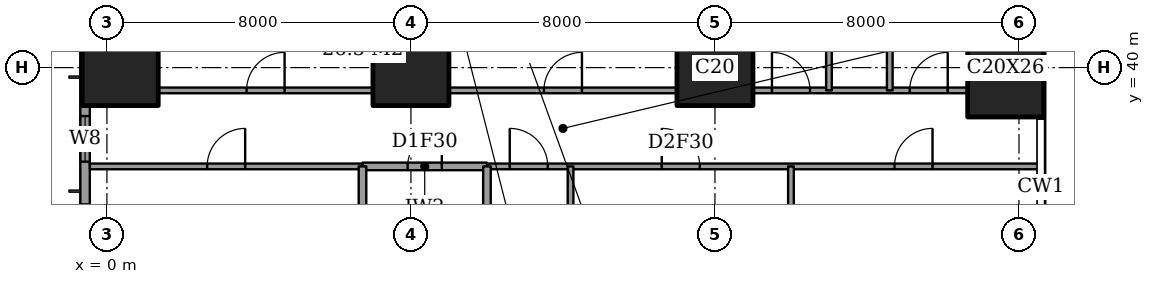
"""IFC4 building model, lengths in metres.
Left out: names, types, materials, properties, quantities, classifications, styles, units other than length and angle.
Written with IfcOpenShell. Run it as: python <this file> out.ifc"""

import sys

from ifc_helpers import new_model, si_unit, direction, frame, frame_2d, origin, origin_2d, place, context, subcontext, project, spatial, rectangle, extrude, element, fill, save


model = new_model("IFC4")
c1 = context("Model", 3, precision=1e-05, world=origin(), true_north=direction((0.0, 1.0)))
c2 = subcontext(c1, "Body", "Model", "MODEL_VIEW")
j1 = project(units=[si_unit("LENGTHUNIT", "METRE"), si_unit("PLANEANGLEUNIT", "RADIAN")], contexts=[c1])
p1 = place(None, origin())
s1 = spatial("IfcSite", under=j1, at=p1, CompositionType="ELEMENT")
p2 = place(p1, origin())
s2 = spatial("IfcBuilding", under=s1, at=p2, CompositionType="ELEMENT")
p3 = place(p2, frame((0.0, 0.0, 83.6)))
s3 = spatial("IfcBuildingStorey", under=s2, at=p3, CompositionType="ELEMENT", Elevation=83.6)
for number, where, z_axis, x_axis in (
    (1, (0.35, 40.0, 0.0), (0.0, 0.0, 1.0), (1.0, 0.0, 0.0)),
    (2, (8.0, 40.0, 0.0), (0.0, 0.0, 1.0), (1.0, 0.0, 0.0)),
    (3, (16.0, 40.0, 0.0), (0.0, 0.0, 1.0), (1.0, 0.0, 0.0)),
):
    element("IfcColumn", number, at=place(p3, frame(where, z_axis=z_axis, x_axis=x_axis)), inside=s3, PredefinedType="COLUMN", context=c2, shape_type="SweptSolid", body=[
        extrude(rectangle(XDim=2.0, YDim=2.0, at=origin_2d()), origin(), (0.0, 0.0, 1.0), 3.6),
    ])
p4 = place(p3, frame((23.65, 40.0, 0.0), z_axis=(0.0, 0.0, 1.0), x_axis=(1.0, 0.0, 0.0)))
e4 = element("IfcColumn", 4, at=p4, inside=s3, PredefinedType="COLUMN", context=c2, shape_type="SweptSolid", body=[
    extrude(rectangle(XDim=2.0, YDim=2.6, at=origin_2d()), origin(), (0.0, 0.0, 1.0), 3.6),
])
p5 = place(p3, frame((-0.575, 44.825, 0.0), z_axis=(0.0, 0.0, 1.0), x_axis=(0.0, -1.0, 0.0)))
e5 = element("IfcWall", 5, at=p5, inside=s3, PredefinedType="SOLIDWALL", context=c2, shape_type="SweptSolid", body=[
    extrude(rectangle(XDim=41.65, YDim=0.25, at=frame_2d((20.825, 0.0))), origin(), (0.0, 0.0, 1.0), 3.6),
])
p6 = place(p5, frame((0.775, 0.0, 0.6)))
e6 = element("IfcOpeningElement", 6, at=p6, cuts=e5, PredefinedType="OPENING", context=c2, shape_type="SweptSolid", body=[
    extrude(rectangle(XDim=2.4, YDim=2.0, at=frame_2d((1.2, 1.0))), frame((0.0, 0.135, 0.0), z_axis=(0.0, -1.0, 0.0), x_axis=(1.0, 0.0, 0.0)), (0.0, 0.0, 1.0), 0.27),
])
p7 = place(p5, frame((6.1, 0.0, 0.6)))
e7 = element("IfcOpeningElement", 7, at=p7, cuts=e5, PredefinedType="OPENING", context=c2, shape_type="SweptSolid", body=[
    extrude(rectangle(XDim=1.2, YDim=2.0, at=frame_2d((0.6, 1.0))), frame((0.0, 0.135, 0.0), z_axis=(0.0, -1.0, 0.0), x_axis=(1.0, 0.0, 0.0)), (0.0, 0.0, 1.0), 0.27),
])
p8 = place(p5, frame((8.425, 0.0, 0.6)))
e8 = element("IfcOpeningElement", 8, at=p8, cuts=e5, PredefinedType="OPENING", context=c2, shape_type="SweptSolid", body=[
    extrude(rectangle(XDim=2.4, YDim=2.0, at=frame_2d((1.2, 1.0))), frame((0.0, 0.135, 0.0), z_axis=(0.0, -1.0, 0.0), x_axis=(1.0, 0.0, 0.0)), (0.0, 0.0, 1.0), 0.27),
])
p9 = place(p5, frame((15.625, 0.0, 0.6)))
e9 = element("IfcOpeningElement", 9, at=p9, cuts=e5, PredefinedType="OPENING", context=c2, shape_type="SweptSolid", body=[
    extrude(rectangle(XDim=2.4, YDim=2.0, at=frame_2d((1.2, 1.0))), frame((0.0, 0.135, 0.0), z_axis=(0.0, -1.0, 0.0), x_axis=(1.0, 0.0, 0.0)), (0.0, 0.0, 1.0), 0.27),
])
p10 = place(p5, frame((23.625, 0.0, 0.6)))
e10 = element("IfcOpeningElement", 10, at=p10, cuts=e5, PredefinedType="OPENING", context=c2, shape_type="SweptSolid", body=[
    extrude(rectangle(XDim=2.4, YDim=2.0, at=frame_2d((1.2, 1.0))), frame((0.0, 0.135, 0.0), z_axis=(0.0, -1.0, 0.0), x_axis=(1.0, 0.0, 0.0)), (0.0, 0.0, 1.0), 0.27),
])
p11 = place(p5, frame((30.825, 0.0, 0.6)))
e11 = element("IfcOpeningElement", 11, at=p11, cuts=e5, PredefinedType="OPENING", context=c2, shape_type="SweptSolid", body=[
    extrude(rectangle(XDim=2.4, YDim=2.0, at=frame_2d((1.2, 1.0))), frame((0.0, 0.135, 0.0), z_axis=(0.0, -1.0, 0.0), x_axis=(1.0, 0.0, 0.0)), (0.0, 0.0, 1.0), 0.27),
])
p12 = place(p5, frame((34.5, 0.0, 0.6)))
e12 = element("IfcOpeningElement", 12, at=p12, cuts=e5, PredefinedType="OPENING", context=c2, shape_type="SweptSolid", body=[
    extrude(rectangle(XDim=1.2, YDim=2.0, at=frame_2d((0.6, 1.0))), frame((0.0, 0.135, 0.0), z_axis=(0.0, -1.0, 0.0), x_axis=(1.0, 0.0, 0.0)), (0.0, 0.0, 1.0), 0.27),
])
p13 = place(p5, frame((38.475, 0.0, 0.6)))
e13 = element("IfcOpeningElement", 13, at=p13, cuts=e5, PredefinedType="OPENING", context=c2, shape_type="SweptSolid", body=[
    extrude(rectangle(XDim=2.4, YDim=2.0, at=frame_2d((1.2, 1.0))), frame((0.0, 0.135, 0.0), z_axis=(0.0, -1.0, 0.0), x_axis=(1.0, 0.0, 0.0)), (0.0, 0.0, 1.0), 0.27),
])
p14 = place(p3, frame((6.725, 37.4, 0.0), z_axis=(0.0, 0.0, 1.0), x_axis=(1.0, 0.0, 0.0)))
e14 = element("IfcWall", 14, at=p14, inside=s3, PredefinedType="PARTITIONING", context=c2, shape_type="SweptSolid", body=[
    extrude(rectangle(XDim=3.275, YDim=0.2, at=frame_2d((1.637, 0.0))), origin(), (0.0, 0.0, 1.0), 3.35),
])
p15 = place(p14, frame((1.188, 0.0, 0.0)))
e15 = element("IfcOpeningElement", 15, at=p15, cuts=e14, PredefinedType="OPENING", context=c2, shape_type="SweptSolid", body=[
    extrude(rectangle(XDim=0.9, YDim=2.1, at=frame_2d((0.45, 1.05))), frame((0.0, 0.11, 0.0), z_axis=(0.0, -1.0, 0.0), x_axis=(1.0, 0.0, 0.0)), (0.0, 0.0, 1.0), 0.22),
])
p16 = place(p3, frame((-0.45, 37.4, 0.0), z_axis=(0.0, 0.0, 1.0), x_axis=(1.0, 0.0, 0.0)))
e16 = element("IfcWall", 16, at=p16, inside=s3, PredefinedType="PARTITIONING", context=c2, shape_type="SweptSolid", body=[
    extrude(rectangle(XDim=7.175, YDim=0.15, at=frame_2d((3.587, 0.0))), origin(), (0.0, 0.0, 1.0), 3.35),
])
p17 = place(p16, frame((3.087, 0.0, 0.0)))
e17 = element("IfcOpeningElement", 17, at=p17, cuts=e16, PredefinedType="OPENING", context=c2, shape_type="SweptSolid", body=[
    extrude(rectangle(XDim=1.0, YDim=2.1, at=frame_2d((0.5, 1.05))), frame((0.0, 0.085, 0.0), z_axis=(0.0, -1.0, 0.0), x_axis=(1.0, 0.0, 0.0)), (0.0, 0.0, 1.0), 0.17),
])
p18 = place(p3, frame((10.0, 37.4, 0.0), z_axis=(0.0, 0.0, 1.0), x_axis=(1.0, 0.0, 0.0)))
e18 = element("IfcWall", 18, at=p18, inside=s3, PredefinedType="PARTITIONING", context=c2, shape_type="SweptSolid", body=[
    extrude(rectangle(XDim=14.561, YDim=0.15, at=frame_2d((7.281, 0.0))), origin(), (0.0, 0.0, 1.0), 3.35),
])
p19 = place(p18, frame((0.6, 0.0, 0.0)))
e19 = element("IfcOpeningElement", 19, at=p19, cuts=e18, PredefinedType="OPENING", context=c2, shape_type="SweptSolid", body=[
    extrude(rectangle(XDim=1.0, YDim=2.1, at=frame_2d((0.5, 1.05))), frame((0.0, 0.085, 0.0), z_axis=(0.0, -1.0, 0.0), x_axis=(1.0, 0.0, 0.0)), (0.0, 0.0, 1.0), 0.17),
])
p20 = place(p18, frame((4.6, 0.0, 0.0)))
e20 = element("IfcOpeningElement", 20, at=p20, cuts=e18, PredefinedType="OPENING", context=c2, shape_type="SweptSolid", body=[
    extrude(rectangle(XDim=1.0, YDim=2.1, at=frame_2d((0.5, 1.05))), frame((0.0, 0.085, 0.0), z_axis=(0.0, -1.0, 0.0), x_axis=(1.0, 0.0, 0.0)), (0.0, 0.0, 1.0), 0.17),
])
p21 = place(p18, frame((10.725, 0.0, 0.0)))
e21 = element("IfcOpeningElement", 21, at=p21, cuts=e18, PredefinedType="OPENING", context=c2, shape_type="SweptSolid", body=[
    extrude(rectangle(XDim=1.0, YDim=2.1, at=frame_2d((0.5, 1.05))), frame((0.0, 0.085, 0.0), z_axis=(0.0, -1.0, 0.0), x_axis=(1.0, 0.0, 0.0)), (0.0, 0.0, 1.0), 0.17),
])
p22 = place(p3, frame((1.35, 39.4, 0.0), z_axis=(0.0, 0.0, 1.0), x_axis=(1.0, 0.0, 0.0)))
e22 = element("IfcWall", 22, at=p22, inside=s3, PredefinedType="PARTITIONING", context=c2, shape_type="SweptSolid", body=[
    extrude(rectangle(XDim=5.65, YDim=0.15, at=frame_2d((2.825, 0.0))), origin(), (0.0, 0.0, 1.0), 3.35),
])
p23 = place(p22, frame((2.325, 0.0, 0.0)))
e23 = element("IfcOpeningElement", 23, at=p23, cuts=e22, PredefinedType="OPENING", context=c2, shape_type="SweptSolid", body=[
    extrude(rectangle(XDim=1.0, YDim=2.1, at=frame_2d((0.5, 1.05))), frame((0.0, 0.085, 0.0), z_axis=(0.0, -1.0, 0.0), x_axis=(1.0, 0.0, 0.0)), (0.0, 0.0, 1.0), 0.17),
])
p24 = place(p3, frame((9.0, 39.4, 0.0), z_axis=(0.0, 0.0, 1.0), x_axis=(1.0, 0.0, 0.0)))
e24 = element("IfcWall", 24, at=p24, inside=s3, PredefinedType="PARTITIONING", context=c2, shape_type="SweptSolid", body=[
    extrude(rectangle(XDim=6.0, YDim=0.15, at=frame_2d((3.0, 0.0))), origin(), (0.0, 0.0, 1.0), 3.35),
])
p25 = place(p24, frame((2.5, 0.0, 0.0)))
e25 = element("IfcOpeningElement", 25, at=p25, cuts=e24, PredefinedType="OPENING", context=c2, shape_type="SweptSolid", body=[
    extrude(rectangle(XDim=1.0, YDim=2.1, at=frame_2d((0.5, 1.05))), frame((0.0, 0.085, 0.0), z_axis=(0.0, -1.0, 0.0), x_axis=(1.0, 0.0, 0.0)), (0.0, 0.0, 1.0), 0.17),
])
p26 = place(p3, frame((17.0, 39.4, 0.0), z_axis=(0.0, 0.0, 1.0), x_axis=(1.0, 0.0, 0.0)))
e26 = element("IfcWall", 26, at=p26, inside=s3, PredefinedType="PARTITIONING", context=c2, shape_type="SweptSolid", body=[
    extrude(rectangle(XDim=5.65, YDim=0.15, at=frame_2d((2.825, 0.0))), origin(), (0.0, 0.0, 1.0), 3.35),
])
p27 = place(p26, frame((0.5, 0.0, 0.0)))
e27 = element("IfcOpeningElement", 27, at=p27, cuts=e26, PredefinedType="OPENING", context=c2, shape_type="SweptSolid", body=[
    extrude(rectangle(XDim=1.0, YDim=2.1, at=frame_2d((0.5, 1.05))), frame((0.0, 0.085, 0.0), z_axis=(0.0, -1.0, 0.0), x_axis=(1.0, 0.0, 0.0)), (0.0, 0.0, 1.0), 0.17),
])
p28 = place(p26, frame((4.125, 0.0, 0.0)))
e28 = element("IfcOpeningElement", 28, at=p28, cuts=e26, PredefinedType="OPENING", context=c2, shape_type="SweptSolid", body=[
    extrude(rectangle(XDim=1.0, YDim=2.1, at=frame_2d((0.5, 1.05))), frame((0.0, 0.085, 0.0), z_axis=(0.0, -1.0, 0.0), x_axis=(1.0, 0.0, 0.0)), (0.0, 0.0, 1.0), 0.17),
])
p29 = place(p3, frame((6.725, 33.2, 0.0), z_axis=(0.0, 0.0, 1.0), x_axis=(0.0, 1.0, 0.0)))
e29 = element("IfcWall", 29, at=p29, inside=s3, PredefinedType="PARTITIONING", context=c2, shape_type="SweptSolid", body=[
    extrude(rectangle(XDim=4.2, YDim=0.2, at=frame_2d((2.1, 0.0))), origin(), (0.0, 0.0, 1.0), 3.35),
])
p30 = place(p3, frame((10.0, 31.0, 0.0), z_axis=(0.0, 0.0, 1.0), x_axis=(0.0, 1.0, 0.0)))
e30 = element("IfcWall", 30, at=p30, inside=s3, PredefinedType="PARTITIONING", context=c2, shape_type="SweptSolid", body=[
    extrude(rectangle(XDim=6.4, YDim=0.2, at=frame_2d((3.2, 0.0))), origin(), (0.0, 0.0, 1.0), 3.35),
])
p31 = place(p3, frame((12.2, 30.675, 0.0), z_axis=(0.0, 0.0, 1.0), x_axis=(0.0, 1.0, 0.0)))
e31 = element("IfcWall", 31, at=p31, inside=s3, PredefinedType="PARTITIONING", context=c2, shape_type="SweptSolid", body=[
    extrude(rectangle(XDim=6.725, YDim=0.15, at=frame_2d((3.362, 0.0))), origin(), (0.0, 0.0, 1.0), 3.35),
])
p32 = place(p3, frame((18.0, 28.0, 0.0), z_axis=(0.0, 0.0, 1.0), x_axis=(0.0, 1.0, 0.0)))
e32 = element("IfcWall", 32, at=p32, inside=s3, PredefinedType="PARTITIONING", context=c2, shape_type="SweptSolid", body=[
    extrude(rectangle(XDim=9.4, YDim=0.15, at=frame_2d((4.7, 0.0))), origin(), (0.0, 0.0, 1.0), 3.35),
])
p33 = place(p32, frame((0.887, 0.0, 0.0)))
e33 = element("IfcOpeningElement", 33, at=p33, cuts=e32, PredefinedType="OPENING", context=c2, shape_type="SweptSolid", body=[
    extrude(rectangle(XDim=0.9, YDim=2.1, at=frame_2d((0.45, 1.05))), frame((0.0, 0.085, 0.0), z_axis=(0.0, -1.0, 0.0), x_axis=(1.0, 0.0, 0.0)), (0.0, 0.0, 1.0), 0.17),
])
p34 = place(p3, frame((19.0, 39.4, 0.0), z_axis=(0.0, 0.0, 1.0), x_axis=(0.0, 1.0, 0.0)))
e34 = element("IfcWall", 34, at=p34, inside=s3, PredefinedType="PARTITIONING", context=c2, shape_type="SweptSolid", body=[
    extrude(rectangle(XDim=9.05, YDim=0.15, at=frame_2d((4.525, 0.0))), origin(), (0.0, 0.0, 1.0), 3.35),
])
p35 = place(p3, frame((20.6, 39.4, 0.0), z_axis=(0.0, 0.0, 1.0), x_axis=(0.0, 1.0, 0.0)))
e35 = element("IfcWall", 35, at=p35, inside=s3, PredefinedType="PARTITIONING", context=c2, shape_type="SweptSolid", body=[
    extrude(rectangle(XDim=9.05, YDim=0.15, at=frame_2d((4.525, 0.0))), origin(), (0.0, 0.0, 1.0), 3.35),
])
p36 = place(p35, frame((4.075, 0.0, 0.0)))
e36 = element("IfcOpeningElement", 36, at=p36, cuts=e35, PredefinedType="OPENING", context=c2, shape_type="SweptSolid", body=[
    extrude(rectangle(XDim=0.9, YDim=2.1, at=frame_2d((0.45, 1.05))), frame((0.0, 0.085, 0.0), z_axis=(0.0, -1.0, 0.0), x_axis=(1.0, 0.0, 0.0)), (0.0, 0.0, 1.0), 0.17),
])
p37 = place(p7, origin())
e37 = element("IfcWindow", 37, at=p37, inside=s3, PartitioningType="SINGLE_PANEL", PredefinedType="WINDOW", context=c2, shape_type="SweptSolid", body=[
    extrude(rectangle(XDim=1.2, YDim=2.0, at=frame_2d((0.6, 1.0))), frame((0.0, 0.03, 0.0), z_axis=(0.0, -1.0, 0.0), x_axis=(1.0, 0.0, 0.0)), (0.0, 0.0, 1.0), 0.06),
])
fill(e7, e37)
p38 = place(p23, origin())
e38 = element("IfcDoor", 38, at=p38, inside=s3, OperationType="SINGLE_SWING_LEFT", PredefinedType="DOOR", context=c2, shape_type="SweptSolid", body=[
    extrude(rectangle(XDim=1.0, YDim=2.1, at=frame_2d((0.5, 1.05))), frame((0.0, 0.025, 0.0), z_axis=(0.0, -1.0, 0.0), x_axis=(1.0, 0.0, 0.0)), (0.0, 0.0, 1.0), 0.05),
])
fill(e23, e38)
p39 = place(p25, origin())
e39 = element("IfcDoor", 39, at=p39, inside=s3, OperationType="SINGLE_SWING_LEFT", PredefinedType="DOOR", context=c2, shape_type="SweptSolid", body=[
    extrude(rectangle(XDim=1.0, YDim=2.1, at=frame_2d((0.5, 1.05))), frame((0.0, 0.025, 0.0), z_axis=(0.0, -1.0, 0.0), x_axis=(1.0, 0.0, 0.0)), (0.0, 0.0, 1.0), 0.05),
])
fill(e25, e39)
p40 = place(p27, origin())
e40 = element("IfcDoor", 40, at=p40, inside=s3, OperationType="SINGLE_SWING_RIGHT", PredefinedType="DOOR", context=c2, shape_type="SweptSolid", body=[
    extrude(rectangle(XDim=1.0, YDim=2.1, at=frame_2d((0.5, 1.05))), frame((0.0, 0.025, 0.0), z_axis=(0.0, -1.0, 0.0), x_axis=(1.0, 0.0, 0.0)), (0.0, 0.0, 1.0), 0.05),
])
fill(e27, e40)
p41 = place(p28, origin())
e41 = element("IfcDoor", 41, at=p41, inside=s3, OperationType="SINGLE_SWING_LEFT", PredefinedType="DOOR", context=c2, shape_type="SweptSolid", body=[
    extrude(rectangle(XDim=1.0, YDim=2.1, at=frame_2d((0.5, 1.05))), frame((0.0, 0.025, 0.0), z_axis=(0.0, -1.0, 0.0), x_axis=(1.0, 0.0, 0.0)), (0.0, 0.0, 1.0), 0.05),
])
fill(e28, e41)
p42 = place(p19, origin())
e42 = element("IfcDoor", 42, at=p42, inside=s3, OperationType="SINGLE_SWING_RIGHT", PredefinedType="DOOR", context=c2, shape_type="SweptSolid", body=[
    extrude(rectangle(XDim=1.0, YDim=2.1, at=frame_2d((0.5, 1.05))), frame((0.0, 0.025, 0.0), z_axis=(0.0, -1.0, 0.0), x_axis=(1.0, 0.0, 0.0)), (0.0, 0.0, 1.0), 0.05),
])
fill(e19, e42)
p43 = place(p17, origin())
e43 = element("IfcDoor", 43, at=p43, inside=s3, OperationType="SINGLE_SWING_LEFT", PredefinedType="DOOR", context=c2, shape_type="SweptSolid", body=[
    extrude(rectangle(XDim=1.0, YDim=2.1, at=frame_2d((0.5, 1.05))), frame((0.0, 0.025, 0.0), z_axis=(0.0, -1.0, 0.0), x_axis=(1.0, 0.0, 0.0)), (0.0, 0.0, 1.0), 0.05),
])
fill(e17, e43)
p44 = place(p15, origin())
e44 = element("IfcDoor", 44, at=p44, inside=s3, OperationType="SINGLE_SWING_LEFT", PredefinedType="DOOR", context=c2, shape_type="SweptSolid", body=[
    extrude(rectangle(XDim=0.9, YDim=2.1, at=frame_2d((0.45, 1.05))), frame((0.0, 0.025, 0.0), z_axis=(0.0, -1.0, 0.0), x_axis=(1.0, 0.0, 0.0)), (0.0, 0.0, 1.0), 0.05),
])
fill(e15, e44)
p45 = place(p20, origin())
e45 = element("IfcDoor", 45, at=p45, inside=s3, OperationType="SINGLE_SWING_RIGHT", PredefinedType="DOOR", context=c2, shape_type="SweptSolid", body=[
    extrude(rectangle(XDim=1.0, YDim=2.1, at=frame_2d((0.5, 1.05))), frame((0.0, 0.025, 0.0), z_axis=(0.0, -1.0, 0.0), x_axis=(1.0, 0.0, 0.0)), (0.0, 0.0, 1.0), 0.05),
])
fill(e20, e45)
p46 = place(p21, origin())
e46 = element("IfcDoor", 46, at=p46, inside=s3, OperationType="SINGLE_SWING_LEFT", PredefinedType="DOOR", context=c2, shape_type="SweptSolid", body=[
    extrude(rectangle(XDim=1.0, YDim=2.1, at=frame_2d((0.5, 1.05))), frame((0.0, 0.025, 0.0), z_axis=(0.0, -1.0, 0.0), x_axis=(1.0, 0.0, 0.0)), (0.0, 0.0, 1.0), 0.05),
])
fill(e21, e46)
save(model, sys.argv[1])
